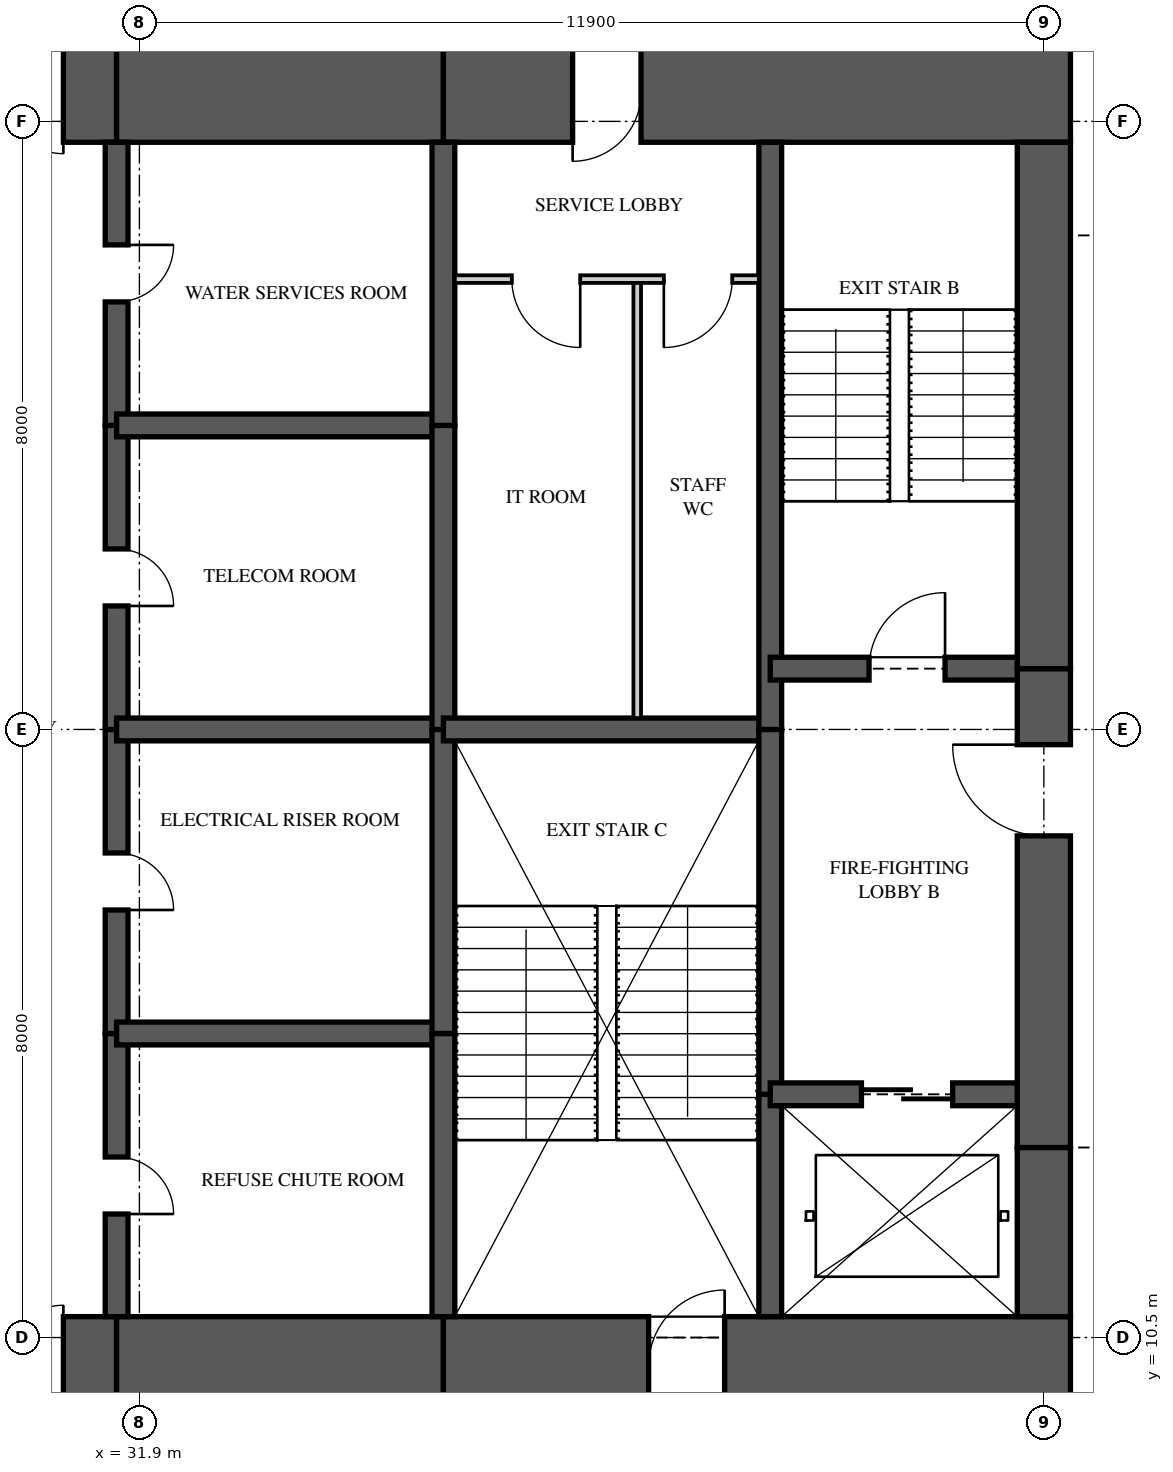
"""IFC4 building model, lengths in metres.
Left out: names, types, materials, properties, quantities, classifications, styles, units other than length and angle.
Written with IfcOpenShell. Run it as: python <this file> out.ifc"""

import sys

from ifc_helpers import new_model, si_unit, direction, frame, frame_2d, origin, place, context, subcontext, project, spatial, rectangle, extrude, element, fill, save


model = new_model("IFC4")
c1 = context("Model", 3, precision=1e-05, world=origin(), true_north=direction((0.0, 1.0)))
c2 = subcontext(c1, "Body", "Model", "MODEL_VIEW")
j1 = project(units=[si_unit("LENGTHUNIT", "METRE"), si_unit("PLANEANGLEUNIT", "RADIAN")], contexts=[c1])
p1 = place(None, origin())
s1 = spatial("IfcSite", under=j1, at=p1, CompositionType="ELEMENT")
p2 = place(p1, origin())
s2 = spatial("IfcBuilding", under=s1, at=p2, CompositionType="ELEMENT")
p3 = place(p2, frame((0.0, 0.0, 167.75)))
s3 = spatial("IfcBuildingStorey", under=s2, at=p3, CompositionType="ELEMENT", Elevation=167.75)
p4 = place(p3, frame((26.0, 10.125, 0.0), z_axis=(0.0, 0.0, 1.0), x_axis=(1.0, 0.0, 0.0)))
e1 = element("IfcWall", 1, at=p4, inside=s3, PredefinedType="SHEAR", context=c2, shape_type="SweptSolid", body=[
    extrude(rectangle(XDim=5.6, YDim=1.3, at=frame_2d((2.8, 0.0))), origin(), (0.0, 0.0, 1.0), 3.35),
])
p5 = place(p4, frame((3.3, 0.0, 0.0)))
e2 = element("IfcOpeningElement", 2, at=p5, cuts=e1, PredefinedType="OPENING", context=c2, shape_type="SweptSolid", body=[
    extrude(rectangle(XDim=1.6, YDim=2.1, at=frame_2d((0.8, 1.05))), frame((0.0, 0.66, 0.0), z_axis=(0.0, -1.0, 0.0), x_axis=(1.0, 0.0, 0.0)), (0.0, 0.0, 1.0), 1.32),
])
p6 = place(p3, frame((31.6, 10.125, 0.0), z_axis=(0.0, 0.0, 1.0), x_axis=(1.0, 0.0, 0.0)))
e3 = element("IfcWall", 3, at=p6, inside=s3, PredefinedType="SHEAR", context=c2, shape_type="SweptSolid", body=[
    extrude(rectangle(XDim=4.3, YDim=1.3, at=frame_2d((2.15, 0.0))), origin(), (0.0, 0.0, 1.0), 3.35),
])
p7 = place(p3, frame((35.9, 10.125, 0.0), z_axis=(0.0, 0.0, 1.0), x_axis=(1.0, 0.0, 0.0)))
e4 = element("IfcWall", 4, at=p7, inside=s3, PredefinedType="SHEAR", context=c2, shape_type="SweptSolid", body=[
    extrude(rectangle(XDim=8.25, YDim=1.3, at=frame_2d((4.125, 0.0))), origin(), (0.0, 0.0, 1.0), 3.35),
])
p8 = place(p7, frame((2.7, 0.0, 0.0)))
e5 = element("IfcOpeningElement", 5, at=p8, cuts=e4, PredefinedType="OPENING", context=c2, shape_type="SweptSolid", body=[
    extrude(rectangle(XDim=1.0, YDim=2.1, at=frame_2d((0.5, 1.05))), frame((0.0, 0.66, 0.0), z_axis=(0.0, -1.0, 0.0), x_axis=(1.0, 0.0, 0.0)), (0.0, 0.0, 1.0), 1.32),
])
p9 = place(p3, frame((44.15, 26.875, 0.0), z_axis=(0.0, 0.0, 1.0), x_axis=(-1.0, 0.0, 0.0)))
e6 = element("IfcWall", 6, at=p9, inside=s3, PredefinedType="SHEAR", context=c2, shape_type="SweptSolid", body=[
    extrude(rectangle(XDim=8.25, YDim=1.3, at=frame_2d((4.125, 0.0))), origin(), (0.0, 0.0, 1.0), 3.35),
])
p10 = place(p9, frame((5.65, 0.0, 0.0)))
e7 = element("IfcOpeningElement", 7, at=p10, cuts=e6, PredefinedType="OPENING", context=c2, shape_type="SweptSolid", body=[
    extrude(rectangle(XDim=0.9, YDim=2.1, at=frame_2d((0.45, 1.05))), frame((0.0, 0.66, 0.0), z_axis=(0.0, -1.0, 0.0), x_axis=(1.0, 0.0, 0.0)), (0.0, 0.0, 1.0), 1.32),
])
p11 = place(p3, frame((35.9, 26.875, 0.0), z_axis=(0.0, 0.0, 1.0), x_axis=(-1.0, 0.0, 0.0)))
e8 = element("IfcWall", 8, at=p11, inside=s3, PredefinedType="SHEAR", context=c2, shape_type="SweptSolid", body=[
    extrude(rectangle(XDim=4.3, YDim=1.3, at=frame_2d((2.15, 0.0))), origin(), (0.0, 0.0, 1.0), 3.35),
])
p12 = place(p3, frame((31.6, 26.875, 0.0), z_axis=(0.0, 0.0, 1.0), x_axis=(-1.0, 0.0, 0.0)))
e9 = element("IfcWall", 9, at=p12, inside=s3, PredefinedType="SHEAR", context=c2, shape_type="SweptSolid", body=[
    extrude(rectangle(XDim=5.6, YDim=1.3, at=frame_2d((2.8, 0.0))), origin(), (0.0, 0.0, 1.0), 3.35),
])
p13 = place(p12, frame((0.7, 0.0, 0.0)))
e10 = element("IfcOpeningElement", 10, at=p13, cuts=e9, PredefinedType="OPENING", context=c2, shape_type="SweptSolid", body=[
    extrude(rectangle(XDim=1.6, YDim=2.1, at=frame_2d((0.8, 1.05))), frame((0.0, 0.66, 0.0), z_axis=(0.0, -1.0, 0.0), x_axis=(1.0, 0.0, 0.0)), (0.0, 0.0, 1.0), 1.32),
])
p14 = place(p3, frame((43.8, 10.775, 0.0), z_axis=(0.0, 0.0, 1.0), x_axis=(0.0, 1.0, 0.0)))
e11 = element("IfcWall", 11, at=p14, inside=s3, PredefinedType="SHEAR", context=c2, shape_type="SweptSolid", body=[
    extrude(rectangle(XDim=2.225, YDim=0.7, at=frame_2d((1.113, 0.0))), origin(), (0.0, 0.0, 1.0), 3.35),
])
p15 = place(p3, frame((43.8, 13.0, 0.0), z_axis=(0.0, 0.0, 1.0), x_axis=(0.0, 1.0, 0.0)))
e12 = element("IfcWall", 12, at=p15, inside=s3, PredefinedType="SHEAR", context=c2, shape_type="SweptSolid", body=[
    extrude(rectangle(XDim=6.3, YDim=0.7, at=frame_2d((3.15, 0.0))), origin(), (0.0, 0.0, 1.0), 3.35),
])
p16 = place(p15, frame((4.1, 0.0, 0.0)))
e13 = element("IfcOpeningElement", 13, at=p16, cuts=e12, PredefinedType="OPENING", context=c2, shape_type="SweptSolid", body=[
    extrude(rectangle(XDim=1.2, YDim=2.2, at=frame_2d((0.6, 1.1))), frame((0.0, 0.36, 0.0), z_axis=(0.0, -1.0, 0.0), x_axis=(1.0, 0.0, 0.0)), (0.0, 0.0, 1.0), 0.72),
])
p17 = place(p3, frame((43.8, 19.3, 0.0), z_axis=(0.0, 0.0, 1.0), x_axis=(0.0, 1.0, 0.0)))
e14 = element("IfcWall", 14, at=p17, inside=s3, PredefinedType="SHEAR", context=c2, shape_type="SweptSolid", body=[
    extrude(rectangle(XDim=6.925, YDim=0.7, at=frame_2d((3.462, 0.0))), origin(), (0.0, 0.0, 1.0), 3.35),
])
p18 = place(p3, frame((31.6, 10.775, 0.0), z_axis=(0.0, 0.0, 1.0), x_axis=(0.0, 1.0, 0.0)))
e15 = element("IfcWall", 15, at=p18, inside=s3, PredefinedType="SHEAR", context=c2, shape_type="SweptSolid", body=[
    extrude(rectangle(XDim=3.725, YDim=0.3, at=frame_2d((1.863, 0.0))), origin(), (0.0, 0.0, 1.0), 3.35),
])
p19 = place(p18, frame((1.35, 0.0, 0.0)))
e16 = element("IfcOpeningElement", 16, at=p19, cuts=e15, PredefinedType="OPENING", context=c2, shape_type="SweptSolid", body=[
    extrude(rectangle(XDim=0.75, YDim=2.1, at=frame_2d((0.375, 1.05))), frame((0.0, 0.16, 0.0), z_axis=(0.0, -1.0, 0.0), x_axis=(1.0, 0.0, 0.0)), (0.0, 0.0, 1.0), 0.32),
])
p20 = place(p3, frame((31.6, 14.5, 0.0), z_axis=(0.0, 0.0, 1.0), x_axis=(0.0, 1.0, 0.0)))
e17 = element("IfcWall", 17, at=p20, inside=s3, PredefinedType="SHEAR", context=c2, shape_type="SweptSolid", body=[
    extrude(rectangle(XDim=4.0, YDim=0.3, at=frame_2d((2.0, 0.0))), origin(), (0.0, 0.0, 1.0), 3.35),
])
p21 = place(p20, frame((1.625, 0.0, 0.0)))
e18 = element("IfcOpeningElement", 18, at=p21, cuts=e17, PredefinedType="OPENING", context=c2, shape_type="SweptSolid", body=[
    extrude(rectangle(XDim=0.75, YDim=2.1, at=frame_2d((0.375, 1.05))), frame((0.0, 0.16, 0.0), z_axis=(0.0, -1.0, 0.0), x_axis=(1.0, 0.0, 0.0)), (0.0, 0.0, 1.0), 0.32),
])
p22 = place(p3, frame((31.6, 18.5, 0.0), z_axis=(0.0, 0.0, 1.0), x_axis=(0.0, 1.0, 0.0)))
e19 = element("IfcWall", 19, at=p22, inside=s3, PredefinedType="SHEAR", context=c2, shape_type="SweptSolid", body=[
    extrude(rectangle(XDim=4.0, YDim=0.3, at=frame_2d((2.0, 0.0))), origin(), (0.0, 0.0, 1.0), 3.35),
])
p23 = place(p22, frame((1.625, 0.0, 0.0)))
e20 = element("IfcOpeningElement", 20, at=p23, cuts=e19, PredefinedType="OPENING", context=c2, shape_type="SweptSolid", body=[
    extrude(rectangle(XDim=0.75, YDim=2.1, at=frame_2d((0.375, 1.05))), frame((0.0, 0.16, 0.0), z_axis=(0.0, -1.0, 0.0), x_axis=(1.0, 0.0, 0.0)), (0.0, 0.0, 1.0), 0.32),
])
p24 = place(p3, frame((31.6, 22.5, 0.0), z_axis=(0.0, 0.0, 1.0), x_axis=(0.0, 1.0, 0.0)))
e21 = element("IfcWall", 21, at=p24, inside=s3, PredefinedType="SHEAR", context=c2, shape_type="SweptSolid", body=[
    extrude(rectangle(XDim=3.725, YDim=0.3, at=frame_2d((1.863, 0.0))), origin(), (0.0, 0.0, 1.0), 3.35),
])
p25 = place(p24, frame((1.625, 0.0, 0.0)))
e22 = element("IfcOpeningElement", 22, at=p25, cuts=e21, PredefinedType="OPENING", context=c2, shape_type="SweptSolid", body=[
    extrude(rectangle(XDim=0.75, YDim=2.1, at=frame_2d((0.375, 1.05))), frame((0.0, 0.16, 0.0), z_axis=(0.0, -1.0, 0.0), x_axis=(1.0, 0.0, 0.0)), (0.0, 0.0, 1.0), 0.32),
])
p26 = place(p3, frame((35.9, 10.775, 0.0), z_axis=(0.0, 0.0, 1.0), x_axis=(0.0, 1.0, 0.0)))
e23 = element("IfcWall", 23, at=p26, inside=s3, PredefinedType="SHEAR", context=c2, shape_type="SweptSolid", body=[
    extrude(rectangle(XDim=3.725, YDim=0.3, at=frame_2d((1.863, 0.0))), origin(), (0.0, 0.0, 1.0), 3.35),
])
for number, where, z_axis, x_axis in (
    (24, (35.9, 14.5, 0.0), (0.0, 0.0, 1.0), (0.0, 1.0, 0.0)),
    (25, (35.9, 18.5, 0.0), (0.0, 0.0, 1.0), (0.0, 1.0, 0.0)),
):
    element("IfcWall", number, at=place(p3, frame(where, z_axis=z_axis, x_axis=x_axis)), inside=s3, PredefinedType="SHEAR", context=c2, shape_type="SweptSolid", body=[
        extrude(rectangle(XDim=4.0, YDim=0.3, at=frame_2d((2.0, 0.0))), origin(), (0.0, 0.0, 1.0), 3.35),
    ])
p27 = place(p3, frame((35.9, 22.5, 0.0), z_axis=(0.0, 0.0, 1.0), x_axis=(0.0, 1.0, 0.0)))
e26 = element("IfcWall", 26, at=p27, inside=s3, PredefinedType="SHEAR", context=c2, shape_type="SweptSolid", body=[
    extrude(rectangle(XDim=3.725, YDim=0.3, at=frame_2d((1.863, 0.0))), origin(), (0.0, 0.0, 1.0), 3.35),
])
p28 = place(p3, frame((40.2, 10.775, 0.0), z_axis=(0.0, 0.0, 1.0), x_axis=(0.0, 1.0, 0.0)))
e27 = element("IfcWall", 27, at=p28, inside=s3, PredefinedType="SHEAR", context=c2, shape_type="SweptSolid", body=[
    extrude(rectangle(XDim=2.925, YDim=0.3, at=frame_2d((1.462, 0.0))), origin(), (0.0, 0.0, 1.0), 3.35),
])
p29 = place(p3, frame((40.2, 13.7, 0.0), z_axis=(0.0, 0.0, 1.0), x_axis=(0.0, 1.0, 0.0)))
e28 = element("IfcWall", 28, at=p29, inside=s3, PredefinedType="SHEAR", context=c2, shape_type="SweptSolid", body=[
    extrude(rectangle(XDim=4.8, YDim=0.3, at=frame_2d((2.4, 0.0))), origin(), (0.0, 0.0, 1.0), 3.35),
])
p30 = place(p3, frame((40.2, 18.5, 0.0), z_axis=(0.0, 0.0, 1.0), x_axis=(0.0, 1.0, 0.0)))
e29 = element("IfcWall", 29, at=p30, inside=s3, PredefinedType="SHEAR", context=c2, shape_type="SweptSolid", body=[
    extrude(rectangle(XDim=7.725, YDim=0.3, at=frame_2d((3.863, 0.0))), origin(), (0.0, 0.0, 1.0), 3.35),
])
for number, where, z_axis, x_axis in (
    (30, (31.6, 14.5, 0.0), (0.0, 0.0, 1.0), (1.0, 0.0, 0.0)),
    (31, (31.6, 18.5, 0.0), (0.0, 0.0, 1.0), (1.0, 0.0, 0.0)),
    (32, (31.6, 22.5, 0.0), (0.0, 0.0, 1.0), (1.0, 0.0, 0.0)),
):
    element("IfcWall", number, at=place(p3, frame(where, z_axis=z_axis, x_axis=x_axis)), inside=s3, PredefinedType="SHEAR", context=c2, shape_type="SweptSolid", body=[
        extrude(rectangle(XDim=4.3, YDim=0.3, at=frame_2d((2.15, 0.0))), origin(), (0.0, 0.0, 1.0), 3.35),
    ])
p31 = place(p3, frame((35.9, 18.5, 0.0), z_axis=(0.0, 0.0, 1.0), x_axis=(1.0, 0.0, 0.0)))
e33 = element("IfcWall", 33, at=p31, inside=s3, PredefinedType="SHEAR", context=c2, shape_type="SweptSolid", body=[
    extrude(rectangle(XDim=4.3, YDim=0.3, at=frame_2d((2.15, 0.0))), origin(), (0.0, 0.0, 1.0), 3.35),
])
p32 = place(p3, frame((40.2, 13.7, 0.0), z_axis=(0.0, 0.0, 1.0), x_axis=(1.0, 0.0, 0.0)))
e34 = element("IfcWall", 34, at=p32, inside=s3, PredefinedType="SHEAR", context=c2, shape_type="SweptSolid", body=[
    extrude(rectangle(XDim=3.6, YDim=0.3, at=frame_2d((1.8, 0.0))), origin(), (0.0, 0.0, 1.0), 3.35),
])
p33 = place(p32, frame((1.2, 0.0, 0.0)))
e35 = element("IfcOpeningElement", 35, at=p33, cuts=e34, PredefinedType="OPENING", context=c2, shape_type="SweptSolid", body=[
    extrude(rectangle(XDim=1.2, YDim=2.1, at=frame_2d((0.6, 1.05))), frame((0.0, 0.16, 0.0), z_axis=(0.0, -1.0, 0.0), x_axis=(1.0, 0.0, 0.0)), (0.0, 0.0, 1.0), 0.32),
])
p34 = place(p3, frame((40.2, 19.3, 0.0), z_axis=(0.0, 0.0, 1.0), x_axis=(1.0, 0.0, 0.0)))
e36 = element("IfcWall", 36, at=p34, inside=s3, PredefinedType="SHEAR", context=c2, shape_type="SweptSolid", body=[
    extrude(rectangle(XDim=3.6, YDim=0.3, at=frame_2d((1.8, 0.0))), origin(), (0.0, 0.0, 1.0), 3.35),
])
p35 = place(p34, frame((1.3, 0.0, 0.0)))
e37 = element("IfcOpeningElement", 37, at=p35, cuts=e36, PredefinedType="OPENING", context=c2, shape_type="SweptSolid", body=[
    extrude(rectangle(XDim=1.0, YDim=2.1, at=frame_2d((0.5, 1.05))), frame((0.0, 0.16, 0.0), z_axis=(0.0, -1.0, 0.0), x_axis=(1.0, 0.0, 0.0)), (0.0, 0.0, 1.0), 0.32),
])
p36 = place(p3, frame((36.05, 24.425, 0.0), z_axis=(0.0, 0.0, 1.0), x_axis=(1.0, 0.0, 0.0)))
e38 = element("IfcWall", 38, at=p36, inside=s3, PredefinedType="PARTITIONING", context=c2, shape_type="SweptSolid", body=[
    extrude(rectangle(XDim=4.0, YDim=0.1, at=frame_2d((2.0, 0.0))), origin(), (0.0, 0.0, 1.0), 3.11),
])
p37 = place(p36, frame((0.75, 0.0, 0.0)))
e39 = element("IfcOpeningElement", 39, at=p37, cuts=e38, PredefinedType="OPENING", context=c2, shape_type="SweptSolid", body=[
    extrude(rectangle(XDim=0.9, YDim=2.1, at=frame_2d((0.45, 1.05))), frame((0.0, 0.06, 0.0), z_axis=(0.0, -1.0, 0.0), x_axis=(1.0, 0.0, 0.0)), (0.0, 0.0, 1.0), 0.12),
])
p38 = place(p36, frame((2.75, 0.0, 0.0)))
e40 = element("IfcOpeningElement", 40, at=p38, cuts=e38, PredefinedType="OPENING", context=c2, shape_type="SweptSolid", body=[
    extrude(rectangle(XDim=0.9, YDim=2.1, at=frame_2d((0.45, 1.05))), frame((0.0, 0.06, 0.0), z_axis=(0.0, -1.0, 0.0), x_axis=(1.0, 0.0, 0.0)), (0.0, 0.0, 1.0), 0.12),
])
p39 = place(p3, frame((38.45, 18.65, 0.0), z_axis=(0.0, 0.0, 1.0), x_axis=(0.0, 1.0, 0.0)))
e41 = element("IfcWall", 41, at=p39, inside=s3, PredefinedType="PARTITIONING", context=c2, shape_type="SweptSolid", body=[
    extrude(rectangle(XDim=5.725, YDim=0.1, at=frame_2d((2.863, 0.0))), origin(), (0.0, 0.0, 1.0), 3.11),
])
p40 = place(p37, frame((0.9, 0.0, 0.0), z_axis=(0.0, 0.0, 1.0), x_axis=(-1.0, 0.0, 0.0)))
e42 = element("IfcDoor", 42, at=p40, inside=s3, OperationType="SINGLE_SWING_LEFT", PredefinedType="DOOR", context=c2, shape_type="SweptSolid", body=[
    extrude(rectangle(XDim=0.9, YDim=2.1, at=frame_2d((0.45, 1.05))), frame((0.0, 0.025, 0.0), z_axis=(0.0, -1.0, 0.0), x_axis=(1.0, 0.0, 0.0)), (0.0, 0.0, 1.0), 0.05),
])
fill(e39, e42)
p41 = place(p38, frame((0.9, 0.0, 0.0), z_axis=(0.0, 0.0, 1.0), x_axis=(-1.0, 0.0, 0.0)))
e43 = element("IfcDoor", 43, at=p41, inside=s3, OperationType="SINGLE_SWING_RIGHT", PredefinedType="DOOR", context=c2, shape_type="SweptSolid", body=[
    extrude(rectangle(XDim=0.9, YDim=2.1, at=frame_2d((0.45, 1.05))), frame((0.0, 0.025, 0.0), z_axis=(0.0, -1.0, 0.0), x_axis=(1.0, 0.0, 0.0)), (0.0, 0.0, 1.0), 0.05),
])
fill(e40, e43)
p42 = place(p35, origin())
e44 = element("IfcDoor", 44, at=p42, inside=s3, OperationType="SINGLE_SWING_RIGHT", PredefinedType="DOOR", context=c2, shape_type="SweptSolid", body=[
    extrude(rectangle(XDim=1.0, YDim=2.1, at=frame_2d((0.5, 1.05))), frame((0.0, 0.025, 0.0), z_axis=(0.0, -1.0, 0.0), x_axis=(1.0, 0.0, 0.0)), (0.0, 0.0, 1.0), 0.05),
])
fill(e37, e44)
p43 = place(p16, origin())
e45 = element("IfcDoor", 45, at=p43, inside=s3, OperationType="SINGLE_SWING_RIGHT", PredefinedType="DOOR", context=c2, shape_type="SweptSolid", body=[
    extrude(rectangle(XDim=1.2, YDim=2.2, at=frame_2d((0.6, 1.1))), frame((0.0, 0.025, 0.0), z_axis=(0.0, -1.0, 0.0), x_axis=(1.0, 0.0, 0.0)), (0.0, 0.0, 1.0), 0.05),
])
fill(e13, e45)
p44 = place(p33, origin())
e46 = element("IfcDoor", 46, at=p44, inside=s3, OperationType="SLIDING_TO_LEFT", PredefinedType="DOOR", context=c2, shape_type="SweptSolid", body=[
    extrude(rectangle(XDim=1.2, YDim=2.1, at=frame_2d((0.6, 1.05))), frame((0.0, 0.025, 0.0), z_axis=(0.0, -1.0, 0.0), x_axis=(1.0, 0.0, 0.0)), (0.0, 0.0, 1.0), 0.05),
])
fill(e35, e46)
p45 = place(p5, origin())
e47 = element("IfcDoor", 47, at=p45, inside=s3, OperationType="DOUBLE_DOOR_SINGLE_SWING", PredefinedType="DOOR", context=c2, shape_type="SweptSolid", body=[
    extrude(rectangle(XDim=1.6, YDim=2.1, at=frame_2d((0.8, 1.05))), frame((0.0, 0.025, 0.0), z_axis=(0.0, -1.0, 0.0), x_axis=(1.0, 0.0, 0.0)), (0.0, 0.0, 1.0), 0.05),
])
fill(e2, e47)
p46 = place(p13, origin())
e48 = element("IfcDoor", 48, at=p46, inside=s3, OperationType="DOUBLE_DOOR_SINGLE_SWING", PredefinedType="DOOR", context=c2, shape_type="SweptSolid", body=[
    extrude(rectangle(XDim=1.6, YDim=2.1, at=frame_2d((0.8, 1.05))), frame((0.0, 0.025, 0.0), z_axis=(0.0, -1.0, 0.0), x_axis=(1.0, 0.0, 0.0)), (0.0, 0.0, 1.0), 0.05),
])
fill(e10, e48)
p47 = place(p19, frame((0.75, 0.0, 0.0), z_axis=(0.0, 0.0, 1.0), x_axis=(-1.0, 0.0, 0.0)))
e49 = element("IfcDoor", 49, at=p47, inside=s3, OperationType="SINGLE_SWING_RIGHT", PredefinedType="DOOR", context=c2, shape_type="SweptSolid", body=[
    extrude(rectangle(XDim=0.75, YDim=2.1, at=frame_2d((0.375, 1.05))), frame((0.0, 0.025, 0.0), z_axis=(0.0, -1.0, 0.0), x_axis=(1.0, 0.0, 0.0)), (0.0, 0.0, 1.0), 0.05),
])
fill(e16, e49)
p48 = place(p21, frame((0.75, 0.0, 0.0), z_axis=(0.0, 0.0, 1.0), x_axis=(-1.0, 0.0, 0.0)))
e50 = element("IfcDoor", 50, at=p48, inside=s3, OperationType="SINGLE_SWING_RIGHT", PredefinedType="DOOR", context=c2, shape_type="SweptSolid", body=[
    extrude(rectangle(XDim=0.75, YDim=2.1, at=frame_2d((0.375, 1.05))), frame((0.0, 0.025, 0.0), z_axis=(0.0, -1.0, 0.0), x_axis=(1.0, 0.0, 0.0)), (0.0, 0.0, 1.0), 0.05),
])
fill(e18, e50)
p49 = place(p23, frame((0.75, 0.0, 0.0), z_axis=(0.0, 0.0, 1.0), x_axis=(-1.0, 0.0, 0.0)))
e51 = element("IfcDoor", 51, at=p49, inside=s3, OperationType="SINGLE_SWING_RIGHT", PredefinedType="DOOR", context=c2, shape_type="SweptSolid", body=[
    extrude(rectangle(XDim=0.75, YDim=2.1, at=frame_2d((0.375, 1.05))), frame((0.0, 0.025, 0.0), z_axis=(0.0, -1.0, 0.0), x_axis=(1.0, 0.0, 0.0)), (0.0, 0.0, 1.0), 0.05),
])
fill(e20, e51)
p50 = place(p25, frame((0.75, 0.0, 0.0), z_axis=(0.0, 0.0, 1.0), x_axis=(-1.0, 0.0, 0.0)))
e52 = element("IfcDoor", 52, at=p50, inside=s3, OperationType="SINGLE_SWING_LEFT", PredefinedType="DOOR", context=c2, shape_type="SweptSolid", body=[
    extrude(rectangle(XDim=0.75, YDim=2.1, at=frame_2d((0.375, 1.05))), frame((0.0, 0.025, 0.0), z_axis=(0.0, -1.0, 0.0), x_axis=(1.0, 0.0, 0.0)), (0.0, 0.0, 1.0), 0.05),
])
fill(e22, e52)
p51 = place(p8, origin())
e53 = element("IfcDoor", 53, at=p51, inside=s3, OperationType="SINGLE_SWING_RIGHT", PredefinedType="DOOR", context=c2, shape_type="SweptSolid", body=[
    extrude(rectangle(XDim=1.0, YDim=2.1, at=frame_2d((0.5, 1.05))), frame((0.0, 0.025, 0.0), z_axis=(0.0, -1.0, 0.0), x_axis=(1.0, 0.0, 0.0)), (0.0, 0.0, 1.0), 0.05),
])
fill(e5, e53)
p52 = place(p10, origin())
e54 = element("IfcDoor", 54, at=p52, inside=s3, OperationType="SINGLE_SWING_RIGHT", PredefinedType="DOOR", context=c2, shape_type="SweptSolid", body=[
    extrude(rectangle(XDim=0.9, YDim=2.1, at=frame_2d((0.45, 1.05))), frame((0.0, 0.47, 0.0), z_axis=(0.0, -1.0, 0.0), x_axis=(1.0, 0.0, 0.0)), (0.0, 0.0, 1.0), 0.8),
])
fill(e7, e54)
save(model, sys.argv[1])
